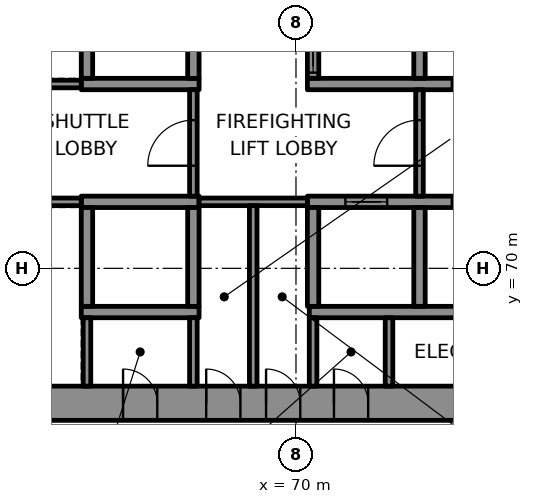
"""IFC4 building model, lengths in metres.
Left out: names, types, materials, properties, quantities, classifications, styles, units other than length and angle.
Written with IfcOpenShell. Run it as: python <this file> out.ifc"""

import sys

from ifc_helpers import new_model, si_unit, direction, frame, frame_2d, origin, place, context, subcontext, project, spatial, rectangle, extrude, element, fill, save


model = new_model("IFC4")
c1 = context("Model", 3, precision=1e-05, world=origin(), true_north=direction((0.0, 1.0)))
c2 = subcontext(c1, "Body", "Model", "MODEL_VIEW")
j1 = project(units=[si_unit("LENGTHUNIT", "METRE"), si_unit("PLANEANGLEUNIT", "RADIAN")], contexts=[c1])
p1 = place(None, origin())
s1 = spatial("IfcSite", under=j1, at=p1, CompositionType="ELEMENT")
p2 = place(p1, origin())
s2 = spatial("IfcBuilding", under=s1, at=p2, CompositionType="ELEMENT")
p3 = place(p2, frame((0.0, 0.0, 31.0)))
s3 = spatial("IfcBuildingStorey", under=s2, at=p3, CompositionType="ELEMENT", Elevation=31.0)
p4 = place(p3, frame((62.0, 66.45, 0.0), z_axis=(0.0, 0.0, 1.0), x_axis=(1.0, 0.0, 0.0)))
e1 = element("IfcWall", 1, at=p4, inside=s3, PredefinedType="SHEAR", context=c2, shape_type="SweptSolid", body=[
    extrude(rectangle(XDim=26.0, YDim=0.9, at=frame_2d((13.0, 0.0))), origin(), (0.0, 0.0, 1.0), 4.05),
])
p5 = place(p4, frame((3.45, 0.0, 0.0)))
e2 = element("IfcOpeningElement", 2, at=p5, cuts=e1, PredefinedType="OPENING", context=c2, shape_type="SweptSolid", body=[
    extrude(rectangle(XDim=0.9, YDim=2.1, at=frame_2d((0.45, 1.05))), frame((0.0, 0.46, 0.0), z_axis=(0.0, -1.0, 0.0), x_axis=(1.0, 0.0, 0.0)), (0.0, 0.0, 1.0), 0.92),
])
p6 = place(p4, frame((5.637, 0.0, 0.0)))
e3 = element("IfcOpeningElement", 3, at=p6, cuts=e1, PredefinedType="OPENING", context=c2, shape_type="SweptSolid", body=[
    extrude(rectangle(XDim=0.9, YDim=2.1, at=frame_2d((0.45, 1.05))), frame((0.0, 0.46, 0.0), z_axis=(0.0, -1.0, 0.0), x_axis=(1.0, 0.0, 0.0)), (0.0, 0.0, 1.0), 0.92),
])
p7 = place(p4, frame((7.212, 0.0, 0.0)))
e4 = element("IfcOpeningElement", 4, at=p7, cuts=e1, PredefinedType="OPENING", context=c2, shape_type="SweptSolid", body=[
    extrude(rectangle(XDim=0.9, YDim=2.1, at=frame_2d((0.45, 1.05))), frame((0.0, 0.46, 0.0), z_axis=(0.0, -1.0, 0.0), x_axis=(1.0, 0.0, 0.0)), (0.0, 0.0, 1.0), 0.92),
])
p8 = place(p4, frame((8.999, 0.0, 0.0)))
e5 = element("IfcOpeningElement", 5, at=p8, cuts=e1, PredefinedType="OPENING", context=c2, shape_type="SweptSolid", body=[
    extrude(rectangle(XDim=0.9, YDim=2.1, at=frame_2d((0.45, 1.05))), frame((0.0, 0.46, 0.0), z_axis=(0.0, -1.0, 0.0), x_axis=(1.0, 0.0, 0.0)), (0.0, 0.0, 1.0), 0.92),
])
p9 = place(p4, frame((17.324, 0.0, 0.0)))
e6 = element("IfcOpeningElement", 6, at=p9, cuts=e1, PredefinedType="OPENING", context=c2, shape_type="SweptSolid", body=[
    extrude(rectangle(XDim=0.9, YDim=2.1, at=frame_2d((0.45, 1.05))), frame((0.0, 0.46, 0.0), z_axis=(0.0, -1.0, 0.0), x_axis=(1.0, 0.0, 0.0)), (0.0, 0.0, 1.0), 0.92),
])
p10 = place(p3, frame((64.35, 68.85, 0.0), z_axis=(0.0, 0.0, 1.0), x_axis=(1.0, 0.0, 0.0)))
e7 = element("IfcWall", 7, at=p10, inside=s3, PredefinedType="SHEAR", context=c2, shape_type="SweptSolid", body=[
    extrude(rectangle(XDim=3.1, YDim=0.3, at=frame_2d((1.55, 0.0))), origin(), (0.0, 0.0, 1.0), 4.05),
])
p11 = place(p3, frame((70.35, 68.85, 0.0), z_axis=(0.0, 0.0, 1.0), x_axis=(1.0, 0.0, 0.0)))
e8 = element("IfcWall", 8, at=p11, inside=s3, PredefinedType="SHEAR", context=c2, shape_type="SweptSolid", body=[
    extrude(rectangle(XDim=16.75, YDim=0.3, at=frame_2d((8.375, 0.0))), origin(), (0.0, 0.0, 1.0), 4.05),
])
p12 = place(p3, frame((64.35, 71.75, 0.0), z_axis=(0.0, 0.0, 1.0), x_axis=(1.0, 0.0, 0.0)))
e9 = element("IfcWall", 9, at=p12, inside=s3, PredefinedType="SHEAR", context=c2, shape_type="SweptSolid", body=[
    extrude(rectangle(XDim=3.1, YDim=0.3, at=frame_2d((1.55, 0.0))), origin(), (0.0, 0.0, 1.0), 4.05),
])
p13 = place(p3, frame((70.3, 71.75, 0.0), z_axis=(0.0, 0.0, 1.0), x_axis=(1.0, 0.0, 0.0)))
e10 = element("IfcWall", 10, at=p13, inside=s3, PredefinedType="SHEAR", context=c2, shape_type="SweptSolid", body=[
    extrude(rectangle(XDim=16.8, YDim=0.3, at=frame_2d((8.4, 0.0))), origin(), (0.0, 0.0, 1.0), 4.05),
])
p14 = place(p13, frame((1.0, 0.0, 0.0)))
e11 = element("IfcOpeningElement", 11, at=p14, cuts=e10, PredefinedType="OPENING", context=c2, shape_type="SweptSolid", body=[
    extrude(rectangle(XDim=1.1, YDim=2.1, at=frame_2d((0.55, 1.05))), frame((0.0, 0.16, 0.0), z_axis=(0.0, -1.0, 0.0), x_axis=(1.0, 0.0, 0.0)), (0.0, 0.0, 1.0), 0.32),
])
p15 = place(p13, frame((3.8, 0.0, 0.0)))
e12 = element("IfcOpeningElement", 12, at=p15, cuts=e10, PredefinedType="OPENING", context=c2, shape_type="SweptSolid", body=[
    extrude(rectangle(XDim=1.1, YDim=2.1, at=frame_2d((0.55, 1.05))), frame((0.0, 0.16, 0.0), z_axis=(0.0, -1.0, 0.0), x_axis=(1.0, 0.0, 0.0)), (0.0, 0.0, 1.0), 0.32),
])
p16 = place(p13, frame((6.6, 0.0, 0.0)))
e13 = element("IfcOpeningElement", 13, at=p16, cuts=e10, PredefinedType="OPENING", context=c2, shape_type="SweptSolid", body=[
    extrude(rectangle(XDim=1.1, YDim=2.1, at=frame_2d((0.55, 1.05))), frame((0.0, 0.16, 0.0), z_axis=(0.0, -1.0, 0.0), x_axis=(1.0, 0.0, 0.0)), (0.0, 0.0, 1.0), 0.32),
])
p17 = place(p13, frame((9.4, 0.0, 0.0)))
e14 = element("IfcOpeningElement", 14, at=p17, cuts=e10, PredefinedType="OPENING", context=c2, shape_type="SweptSolid", body=[
    extrude(rectangle(XDim=1.1, YDim=2.1, at=frame_2d((0.55, 1.05))), frame((0.0, 0.16, 0.0), z_axis=(0.0, -1.0, 0.0), x_axis=(1.0, 0.0, 0.0)), (0.0, 0.0, 1.0), 0.32),
])
p18 = place(p13, frame((12.2, 0.0, 0.0)))
e15 = element("IfcOpeningElement", 15, at=p18, cuts=e10, PredefinedType="OPENING", context=c2, shape_type="SweptSolid", body=[
    extrude(rectangle(XDim=1.1, YDim=2.1, at=frame_2d((0.55, 1.05))), frame((0.0, 0.16, 0.0), z_axis=(0.0, -1.0, 0.0), x_axis=(1.0, 0.0, 0.0)), (0.0, 0.0, 1.0), 0.32),
])
p19 = place(p13, frame((14.925, 0.0, 0.0)))
e16 = element("IfcOpeningElement", 16, at=p19, cuts=e10, PredefinedType="OPENING", context=c2, shape_type="SweptSolid", body=[
    extrude(rectangle(XDim=1.1, YDim=2.1, at=frame_2d((0.55, 1.05))), frame((0.0, 0.16, 0.0), z_axis=(0.0, -1.0, 0.0), x_axis=(1.0, 0.0, 0.0)), (0.0, 0.0, 1.0), 0.32),
])
p20 = place(p3, frame((64.35, 74.85, 0.0), z_axis=(0.0, 0.0, 1.0), x_axis=(1.0, 0.0, 0.0)))
e17 = element("IfcWall", 17, at=p20, inside=s3, PredefinedType="SHEAR", context=c2, shape_type="SweptSolid", body=[
    extrude(rectangle(XDim=3.1, YDim=0.3, at=frame_2d((1.55, 0.0))), origin(), (0.0, 0.0, 1.0), 4.05),
])
p21 = place(p3, frame((70.3, 74.85, 0.0), z_axis=(0.0, 0.0, 1.0), x_axis=(1.0, 0.0, 0.0)))
e18 = element("IfcWall", 18, at=p21, inside=s3, PredefinedType="SHEAR", context=c2, shape_type="SweptSolid", body=[
    extrude(rectangle(XDim=16.8, YDim=0.3, at=frame_2d((8.4, 0.0))), origin(), (0.0, 0.0, 1.0), 4.05),
])
p22 = place(p21, frame((3.8, 0.0, 0.0)))
e19 = element("IfcOpeningElement", 19, at=p22, cuts=e18, PredefinedType="OPENING", context=c2, shape_type="SweptSolid", body=[
    extrude(rectangle(XDim=1.1, YDim=2.1, at=frame_2d((0.55, 1.05))), frame((0.0, 0.16, 0.0), z_axis=(0.0, -1.0, 0.0), x_axis=(1.0, 0.0, 0.0)), (0.0, 0.0, 1.0), 0.32),
])
p23 = place(p21, frame((12.2, 0.0, 0.0)))
e20 = element("IfcOpeningElement", 20, at=p23, cuts=e18, PredefinedType="OPENING", context=c2, shape_type="SweptSolid", body=[
    extrude(rectangle(XDim=1.1, YDim=2.1, at=frame_2d((0.55, 1.05))), frame((0.0, 0.16, 0.0), z_axis=(0.0, -1.0, 0.0), x_axis=(1.0, 0.0, 0.0)), (0.0, 0.0, 1.0), 0.32),
])
p24 = place(p21, frame((14.925, 0.0, 0.0)))
e21 = element("IfcOpeningElement", 21, at=p24, cuts=e18, PredefinedType="OPENING", context=c2, shape_type="SweptSolid", body=[
    extrude(rectangle(XDim=1.1, YDim=2.1, at=frame_2d((0.55, 1.05))), frame((0.0, 0.16, 0.0), z_axis=(0.0, -1.0, 0.0), x_axis=(1.0, 0.0, 0.0)), (0.0, 0.0, 1.0), 0.32),
])
for number, where, z_axis, x_axis in (
    (22, (64.5, 69.0, 0.0), (0.0, 0.0, 1.0), (0.0, 1.0, 0.0)),
    (23, (64.5, 75.0, 0.0), (0.0, 0.0, 1.0), (0.0, 1.0, 0.0)),
    (24, (67.3, 69.0, 0.0), (0.0, 0.0, 1.0), (0.0, 1.0, 0.0)),
    (25, (67.3, 75.0, 0.0), (0.0, 0.0, 1.0), (0.0, 1.0, 0.0)),
    (26, (70.45, 69.0, 0.0), (0.0, 0.0, 1.0), (0.0, 1.0, 0.0)),
):
    element("IfcWall", number, at=place(p3, frame(where, z_axis=z_axis, x_axis=x_axis)), inside=s3, PredefinedType="SHEAR", context=c2, shape_type="SweptSolid", body=[
        extrude(rectangle(XDim=2.6, YDim=0.3, at=frame_2d((1.3, 0.0))), origin(), (0.0, 0.0, 1.0), 4.05),
    ])
p25 = place(p3, frame((70.45, 75.0, 0.0), z_axis=(0.0, 0.0, 1.0), x_axis=(0.0, 1.0, 0.0)))
e27 = element("IfcWall", 27, at=p25, inside=s3, PredefinedType="SHEAR", context=c2, shape_type="SweptSolid", body=[
    extrude(rectangle(XDim=2.6, YDim=0.3, at=frame_2d((1.3, 0.0))), origin(), (0.0, 0.0, 1.0), 4.05),
])
p26 = place(p25, frame((0.15, 0.0, 0.0)))
e28 = element("IfcOpeningElement", 28, at=p26, cuts=e27, PredefinedType="OPENING", context=c2, shape_type="SweptSolid", body=[
    extrude(rectangle(XDim=1.1, YDim=2.1, at=frame_2d((0.55, 1.05))), frame((0.0, 0.16, 0.0), z_axis=(0.0, -1.0, 0.0), x_axis=(1.0, 0.0, 0.0)), (0.0, 0.0, 1.0), 0.32),
])
for number, where, z_axis, x_axis in (
    (29, (73.25, 69.0, 0.0), (0.0, 0.0, 1.0), (0.0, 1.0, 0.0)),
    (30, (73.25, 75.0, 0.0), (0.0, 0.0, 1.0), (0.0, 1.0, 0.0)),
):
    element("IfcWall", number, at=place(p3, frame(where, z_axis=z_axis, x_axis=x_axis)), inside=s3, PredefinedType="SHEAR", context=c2, shape_type="SweptSolid", body=[
        extrude(rectangle(XDim=2.6, YDim=0.3, at=frame_2d((1.3, 0.0))), origin(), (0.0, 0.0, 1.0), 4.05),
    ])
p27 = place(p3, frame((71.348, 110.424, 0.0), z_axis=(0.0, 0.0, 1.0), x_axis=(-0.500000550228, -0.86602508611, 0.0)))
e31 = element("IfcWall", 31, at=p27, inside=s3, PredefinedType="SOLIDWALL", context=c2, shape_type="SweptSolid", body=[
    extrude(rectangle(XDim=57.704, YDim=0.3, at=frame_2d((28.852, 0.0))), origin(), (0.0, 0.0, 1.0), 4.05),
])
p28 = place(p27, frame((0.89, 0.0, 0.8)))
e32 = element("IfcOpeningElement", 32, at=p28, cuts=e31, PredefinedType="OPENING", context=c2, shape_type="SweptSolid", body=[
    extrude(rectangle(XDim=3.0, YDim=2.4, at=frame_2d((1.5, 1.2))), frame((0.0, 0.16, 0.0), z_axis=(0.0, -1.0, 0.0), x_axis=(1.0, 0.0, 0.0)), (0.0, 0.0, 1.0), 0.32),
])
p29 = place(p27, frame((4.67, 0.0, 0.8)))
e33 = element("IfcOpeningElement", 33, at=p29, cuts=e31, PredefinedType="OPENING", context=c2, shape_type="SweptSolid", body=[
    extrude(rectangle(XDim=3.0, YDim=2.4, at=frame_2d((1.5, 1.2))), frame((0.0, 0.16, 0.0), z_axis=(0.0, -1.0, 0.0), x_axis=(1.0, 0.0, 0.0)), (0.0, 0.0, 1.0), 0.32),
])
p30 = place(p27, frame((8.451, 0.0, 0.8)))
e34 = element("IfcOpeningElement", 34, at=p30, cuts=e31, PredefinedType="OPENING", context=c2, shape_type="SweptSolid", body=[
    extrude(rectangle(XDim=3.0, YDim=2.4, at=frame_2d((1.5, 1.2))), frame((0.0, 0.16, 0.0), z_axis=(0.0, -1.0, 0.0), x_axis=(1.0, 0.0, 0.0)), (0.0, 0.0, 1.0), 0.32),
])
p31 = place(p27, frame((12.231, 0.0, 0.8)))
e35 = element("IfcOpeningElement", 35, at=p31, cuts=e31, PredefinedType="OPENING", context=c2, shape_type="SweptSolid", body=[
    extrude(rectangle(XDim=3.0, YDim=2.4, at=frame_2d((1.5, 1.2))), frame((0.0, 0.16, 0.0), z_axis=(0.0, -1.0, 0.0), x_axis=(1.0, 0.0, 0.0)), (0.0, 0.0, 1.0), 0.32),
])
p32 = place(p27, frame((16.011, 0.0, 0.8)))
e36 = element("IfcOpeningElement", 36, at=p32, cuts=e31, PredefinedType="OPENING", context=c2, shape_type="SweptSolid", body=[
    extrude(rectangle(XDim=3.0, YDim=2.4, at=frame_2d((1.5, 1.2))), frame((0.0, 0.16, 0.0), z_axis=(0.0, -1.0, 0.0), x_axis=(1.0, 0.0, 0.0)), (0.0, 0.0, 1.0), 0.32),
])
p33 = place(p27, frame((19.792, 0.0, 0.8)))
e37 = element("IfcOpeningElement", 37, at=p33, cuts=e31, PredefinedType="OPENING", context=c2, shape_type="SweptSolid", body=[
    extrude(rectangle(XDim=3.0, YDim=2.4, at=frame_2d((1.5, 1.2))), frame((0.0, 0.16, 0.0), z_axis=(0.0, -1.0, 0.0), x_axis=(1.0, 0.0, 0.0)), (0.0, 0.0, 1.0), 0.32),
])
p34 = place(p27, frame((23.572, 0.0, 0.8)))
e38 = element("IfcOpeningElement", 38, at=p34, cuts=e31, PredefinedType="OPENING", context=c2, shape_type="SweptSolid", body=[
    extrude(rectangle(XDim=3.0, YDim=2.4, at=frame_2d((1.5, 1.2))), frame((0.0, 0.16, 0.0), z_axis=(0.0, -1.0, 0.0), x_axis=(1.0, 0.0, 0.0)), (0.0, 0.0, 1.0), 0.32),
])
p35 = place(p27, frame((27.352, 0.0, 0.8)))
e39 = element("IfcOpeningElement", 39, at=p35, cuts=e31, PredefinedType="OPENING", context=c2, shape_type="SweptSolid", body=[
    extrude(rectangle(XDim=3.0, YDim=2.4, at=frame_2d((1.5, 1.2))), frame((0.0, 0.16, 0.0), z_axis=(0.0, -1.0, 0.0), x_axis=(1.0, 0.0, 0.0)), (0.0, 0.0, 1.0), 0.32),
])
p36 = place(p27, frame((31.132, 0.0, 0.8)))
e40 = element("IfcOpeningElement", 40, at=p36, cuts=e31, PredefinedType="OPENING", context=c2, shape_type="SweptSolid", body=[
    extrude(rectangle(XDim=3.0, YDim=2.4, at=frame_2d((1.5, 1.2))), frame((0.0, 0.16, 0.0), z_axis=(0.0, -1.0, 0.0), x_axis=(1.0, 0.0, 0.0)), (0.0, 0.0, 1.0), 0.32),
])
p37 = place(p27, frame((34.913, 0.0, 0.8)))
e41 = element("IfcOpeningElement", 41, at=p37, cuts=e31, PredefinedType="OPENING", context=c2, shape_type="SweptSolid", body=[
    extrude(rectangle(XDim=3.0, YDim=2.4, at=frame_2d((1.5, 1.2))), frame((0.0, 0.16, 0.0), z_axis=(0.0, -1.0, 0.0), x_axis=(1.0, 0.0, 0.0)), (0.0, 0.0, 1.0), 0.32),
])
p38 = place(p27, frame((38.693, 0.0, 0.8)))
e42 = element("IfcOpeningElement", 42, at=p38, cuts=e31, PredefinedType="OPENING", context=c2, shape_type="SweptSolid", body=[
    extrude(rectangle(XDim=3.0, YDim=2.4, at=frame_2d((1.5, 1.2))), frame((0.0, 0.16, 0.0), z_axis=(0.0, -1.0, 0.0), x_axis=(1.0, 0.0, 0.0)), (0.0, 0.0, 1.0), 0.32),
])
p39 = place(p27, frame((42.473, 0.0, 0.8)))
e43 = element("IfcOpeningElement", 43, at=p39, cuts=e31, PredefinedType="OPENING", context=c2, shape_type="SweptSolid", body=[
    extrude(rectangle(XDim=3.0, YDim=2.4, at=frame_2d((1.5, 1.2))), frame((0.0, 0.16, 0.0), z_axis=(0.0, -1.0, 0.0), x_axis=(1.0, 0.0, 0.0)), (0.0, 0.0, 1.0), 0.32),
])
p40 = place(p27, frame((46.253, 0.0, 0.8)))
e44 = element("IfcOpeningElement", 44, at=p40, cuts=e31, PredefinedType="OPENING", context=c2, shape_type="SweptSolid", body=[
    extrude(rectangle(XDim=3.0, YDim=2.4, at=frame_2d((1.5, 1.2))), frame((0.0, 0.16, 0.0), z_axis=(0.0, -1.0, 0.0), x_axis=(1.0, 0.0, 0.0)), (0.0, 0.0, 1.0), 0.32),
])
p41 = place(p27, frame((50.033, 0.0, 0.8)))
e45 = element("IfcOpeningElement", 45, at=p41, cuts=e31, PredefinedType="OPENING", context=c2, shape_type="SweptSolid", body=[
    extrude(rectangle(XDim=3.0, YDim=2.4, at=frame_2d((1.5, 1.2))), frame((0.0, 0.16, 0.0), z_axis=(0.0, -1.0, 0.0), x_axis=(1.0, 0.0, 0.0)), (0.0, 0.0, 1.0), 0.32),
])
p42 = place(p27, frame((53.814, 0.0, 0.8)))
e46 = element("IfcOpeningElement", 46, at=p42, cuts=e31, PredefinedType="OPENING", context=c2, shape_type="SweptSolid", body=[
    extrude(rectangle(XDim=3.0, YDim=2.4, at=frame_2d((1.5, 1.2))), frame((0.0, 0.16, 0.0), z_axis=(0.0, -1.0, 0.0), x_axis=(1.0, 0.0, 0.0)), (0.0, 0.0, 1.0), 0.32),
])
p43 = place(p3, frame((62.9, 71.75, 0.0), z_axis=(0.0, 0.0, 1.0), x_axis=(1.0, 0.0, 0.0)))
e47 = element("IfcWall", 47, at=p43, inside=s3, PredefinedType="PARTITIONING", context=c2, shape_type="SweptSolid", body=[
    extrude(rectangle(XDim=1.45, YDim=0.2, at=frame_2d((0.725, 0.0))), origin(), (0.0, 0.0, 1.0), 4.05),
])
p44 = place(p3, frame((67.45, 71.75, 0.0), z_axis=(0.0, 0.0, 1.0), x_axis=(1.0, 0.0, 0.0)))
e48 = element("IfcWall", 48, at=p44, inside=s3, PredefinedType="PARTITIONING", context=c2, shape_type="SweptSolid", body=[
    extrude(rectangle(XDim=2.85, YDim=0.2, at=frame_2d((1.425, 0.0))), origin(), (0.0, 0.0, 1.0), 4.05),
])
p45 = place(p3, frame((62.9, 74.85, 0.0), z_axis=(0.0, 0.0, 1.0), x_axis=(1.0, 0.0, 0.0)))
e49 = element("IfcWall", 49, at=p45, inside=s3, PredefinedType="PARTITIONING", context=c2, shape_type="SweptSolid", body=[
    extrude(rectangle(XDim=1.45, YDim=0.2, at=frame_2d((0.725, 0.0))), origin(), (0.0, 0.0, 1.0), 4.05),
])
for number, where, z_axis, x_axis in (
    (50, (64.5, 66.9, 0.0), (0.0, 0.0, 1.0), (0.0, 1.0, 0.0)),
    (51, (67.3, 66.9, 0.0), (0.0, 0.0, 1.0), (0.0, 1.0, 0.0)),
):
    element("IfcWall", number, at=place(p3, frame(where, z_axis=z_axis, x_axis=x_axis)), inside=s3, PredefinedType="PARTITIONING", context=c2, shape_type="SweptSolid", body=[
        extrude(rectangle(XDim=1.8, YDim=0.2, at=frame_2d((0.9, 0.0))), origin(), (0.0, 0.0, 1.0), 4.05),
    ])
p46 = place(p3, frame((67.3, 71.9, 0.0), z_axis=(0.0, 0.0, 1.0), x_axis=(0.0, 1.0, 0.0)))
e52 = element("IfcWall", 52, at=p46, inside=s3, PredefinedType="PARTITIONING", context=c2, shape_type="SweptSolid", body=[
    extrude(rectangle(XDim=2.8, YDim=0.2, at=frame_2d((1.4, 0.0))), origin(), (0.0, 0.0, 1.0), 4.05),
])
p47 = place(p46, frame((0.8, 0.0, 0.0)))
e53 = element("IfcOpeningElement", 53, at=p47, cuts=e52, PredefinedType="OPENING", context=c2, shape_type="SweptSolid", body=[
    extrude(rectangle(XDim=1.2, YDim=2.1, at=frame_2d((0.6, 1.05))), frame((0.0, 0.11, 0.0), z_axis=(0.0, -1.0, 0.0), x_axis=(1.0, 0.0, 0.0)), (0.0, 0.0, 1.0), 0.22),
])
p48 = place(p3, frame((68.875, 66.9, 0.0), z_axis=(0.0, 0.0, 1.0), x_axis=(0.0, 1.0, 0.0)))
e54 = element("IfcWall", 54, at=p48, inside=s3, PredefinedType="PARTITIONING", context=c2, shape_type="SweptSolid", body=[
    extrude(rectangle(XDim=4.75, YDim=0.2, at=frame_2d((2.375, 0.0))), origin(), (0.0, 0.0, 1.0), 4.05),
])
for number, where, z_axis, x_axis in (
    (55, (70.45, 66.9, 0.0), (0.0, 0.0, 1.0), (0.0, 1.0, 0.0)),
    (56, (72.448, 66.9, 0.0), (0.0, 0.0, 1.0), (0.0, 1.0, 0.0)),
):
    element("IfcWall", number, at=place(p3, frame(where, z_axis=z_axis, x_axis=x_axis)), inside=s3, PredefinedType="PARTITIONING", context=c2, shape_type="SweptSolid", body=[
        extrude(rectangle(XDim=1.8, YDim=0.2, at=frame_2d((0.9, 0.0))), origin(), (0.0, 0.0, 1.0), 4.05),
    ])
p49 = place(p3, frame((73.25, 71.9, 0.0), z_axis=(0.0, 0.0, 1.0), x_axis=(0.0, 1.0, 0.0)))
e57 = element("IfcWall", 57, at=p49, inside=s3, PredefinedType="PARTITIONING", context=c2, shape_type="SweptSolid", body=[
    extrude(rectangle(XDim=2.8, YDim=0.2, at=frame_2d((1.4, 0.0))), origin(), (0.0, 0.0, 1.0), 4.05),
])
p50 = place(p49, frame((0.8, 0.0, 0.0)))
e58 = element("IfcOpeningElement", 58, at=p50, cuts=e57, PredefinedType="OPENING", context=c2, shape_type="SweptSolid", body=[
    extrude(rectangle(XDim=1.2, YDim=2.1, at=frame_2d((0.6, 1.05))), frame((0.0, 0.11, 0.0), z_axis=(0.0, -1.0, 0.0), x_axis=(1.0, 0.0, 0.0)), (0.0, 0.0, 1.0), 0.22),
])
p51 = place(p14, origin())
e59 = element("IfcDoor", 59, at=p51, inside=s3, OperationType="DOUBLE_DOOR_SLIDING", PredefinedType="DOOR", context=c2, shape_type="SweptSolid", body=[
    extrude(rectangle(XDim=1.1, YDim=2.1, at=frame_2d((0.55, 1.05))), frame((0.0, 0.025, 0.0), z_axis=(0.0, -1.0, 0.0), x_axis=(1.0, 0.0, 0.0)), (0.0, 0.0, 1.0), 0.05),
])
fill(e11, e59)
p52 = place(p15, origin())
e60 = element("IfcDoor", 60, at=p52, inside=s3, OperationType="DOUBLE_DOOR_SLIDING", PredefinedType="DOOR", context=c2, shape_type="SweptSolid", body=[
    extrude(rectangle(XDim=1.1, YDim=2.1, at=frame_2d((0.55, 1.05))), frame((0.0, 0.025, 0.0), z_axis=(0.0, -1.0, 0.0), x_axis=(1.0, 0.0, 0.0)), (0.0, 0.0, 1.0), 0.05),
])
fill(e12, e60)
p53 = place(p26, origin())
e61 = element("IfcDoor", 61, at=p53, inside=s3, OperationType="DOUBLE_DOOR_SLIDING", PredefinedType="DOOR", context=c2, shape_type="SweptSolid", body=[
    extrude(rectangle(XDim=1.1, YDim=2.1, at=frame_2d((0.55, 1.05))), frame((0.0, 0.025, 0.0), z_axis=(0.0, -1.0, 0.0), x_axis=(1.0, 0.0, 0.0)), (0.0, 0.0, 1.0), 0.05),
])
fill(e28, e61)
p54 = place(p22, origin())
e62 = element("IfcDoor", 62, at=p54, inside=s3, OperationType="DOUBLE_DOOR_SLIDING", PredefinedType="DOOR", context=c2, shape_type="SweptSolid", body=[
    extrude(rectangle(XDim=1.1, YDim=2.1, at=frame_2d((0.55, 1.05))), frame((0.0, 0.025, 0.0), z_axis=(0.0, -1.0, 0.0), x_axis=(1.0, 0.0, 0.0)), (0.0, 0.0, 1.0), 0.05),
])
fill(e19, e62)
p55 = place(p50, origin())
e63 = element("IfcDoor", 63, at=p55, inside=s3, OperationType="SINGLE_SWING_LEFT", PredefinedType="DOOR", context=c2, shape_type="SweptSolid", body=[
    extrude(rectangle(XDim=1.2, YDim=2.1, at=frame_2d((0.6, 1.05))), frame((0.0, 0.025, 0.0), z_axis=(0.0, -1.0, 0.0), x_axis=(1.0, 0.0, 0.0)), (0.0, 0.0, 1.0), 0.05),
])
fill(e58, e63)
p56 = place(p47, origin())
e64 = element("IfcDoor", 64, at=p56, inside=s3, OperationType="SINGLE_SWING_RIGHT", PredefinedType="DOOR", context=c2, shape_type="SweptSolid", body=[
    extrude(rectangle(XDim=1.2, YDim=2.1, at=frame_2d((0.6, 1.05))), frame((0.0, 0.025, 0.0), z_axis=(0.0, -1.0, 0.0), x_axis=(1.0, 0.0, 0.0)), (0.0, 0.0, 1.0), 0.05),
])
fill(e53, e64)
p57 = place(p5, origin())
e65 = element("IfcDoor", 65, at=p57, inside=s3, OperationType="SINGLE_SWING_LEFT", PredefinedType="DOOR", context=c2, shape_type="SweptSolid", body=[
    extrude(rectangle(XDim=0.9, YDim=2.1, at=frame_2d((0.45, 1.05))), frame((0.0, 0.17, 0.0), z_axis=(0.0, -1.0, 0.0), x_axis=(1.0, 0.0, 0.0)), (0.0, 0.0, 1.0), 0.34),
])
fill(e2, e65)
p58 = place(p6, origin())
e66 = element("IfcDoor", 66, at=p58, inside=s3, OperationType="SINGLE_SWING_RIGHT", PredefinedType="DOOR", context=c2, shape_type="SweptSolid", body=[
    extrude(rectangle(XDim=0.9, YDim=2.1, at=frame_2d((0.45, 1.05))), frame((0.0, 0.17, 0.0), z_axis=(0.0, -1.0, 0.0), x_axis=(1.0, 0.0, 0.0)), (0.0, 0.0, 1.0), 0.34),
])
fill(e3, e66)
p59 = place(p7, origin())
e67 = element("IfcDoor", 67, at=p59, inside=s3, OperationType="SINGLE_SWING_LEFT", PredefinedType="DOOR", context=c2, shape_type="SweptSolid", body=[
    extrude(rectangle(XDim=0.9, YDim=2.1, at=frame_2d((0.45, 1.05))), frame((0.0, 0.17, 0.0), z_axis=(0.0, -1.0, 0.0), x_axis=(1.0, 0.0, 0.0)), (0.0, 0.0, 1.0), 0.34),
])
fill(e4, e67)
p60 = place(p8, origin())
e68 = element("IfcDoor", 68, at=p60, inside=s3, OperationType="SINGLE_SWING_RIGHT", PredefinedType="DOOR", context=c2, shape_type="SweptSolid", body=[
    extrude(rectangle(XDim=0.9, YDim=2.1, at=frame_2d((0.45, 1.05))), frame((0.0, 0.17, 0.0), z_axis=(0.0, -1.0, 0.0), x_axis=(1.0, 0.0, 0.0)), (0.0, 0.0, 1.0), 0.34),
])
fill(e5, e68)
save(model, sys.argv[1])
